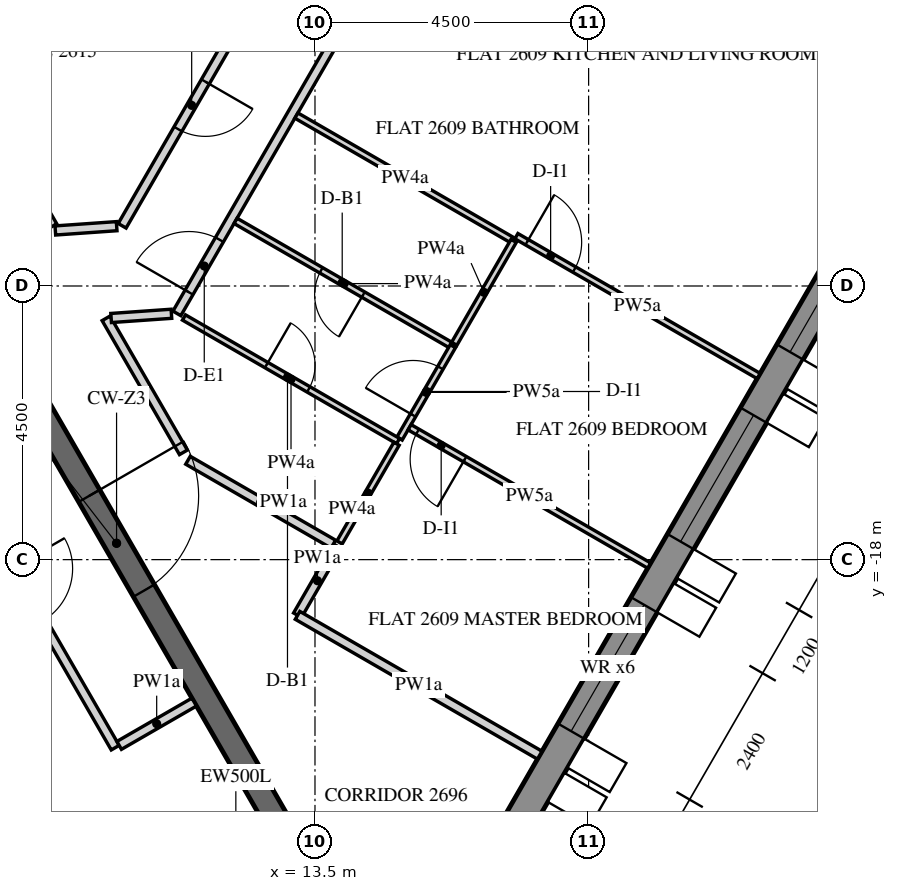
"""IFC4 building model, lengths in metres.
Left out: names, types, materials, properties, quantities, classifications, styles, units other than length and angle.
Written with IfcOpenShell. Run it as: python <this file> out.ifc"""

import sys

from ifc_helpers import new_model, si_unit, direction, frame, frame_2d, origin, place, context, subcontext, project, spatial, polyline, rectangle, outline, extrude, element, fill, save


model = new_model("IFC4")
c1 = context("Model", 3, precision=1e-05, world=origin(), true_north=direction((0.0, 1.0)))
c2 = subcontext(c1, "Body", "Model", "MODEL_VIEW")
j1 = project(units=[si_unit("LENGTHUNIT", "METRE"), si_unit("PLANEANGLEUNIT", "RADIAN")], contexts=[c1])
p1 = place(None, origin())
s1 = spatial("IfcSite", under=j1, at=p1, CompositionType="ELEMENT")
p2 = place(p1, origin())
s2 = spatial("IfcBuilding", under=s1, at=p2, CompositionType="ELEMENT")
p3 = place(p2, frame((0.0, 0.0, 326.4)))
s3 = spatial("IfcBuildingStorey", under=s2, at=p3, CompositionType="ELEMENT", Elevation=326.4)
p4 = place(p3, frame((16.451, -23.005, -0.15), z_axis=(0.0, 0.0, 1.0), x_axis=(0.500003737743, 0.866023245787, 0.0)))
e1 = element("IfcWall", 1, at=p4, inside=s3, PredefinedType="SOLIDWALL", context=c2, shape_type="SweptSolid", body=[
    extrude(outline(polyline([(-0.021, -0.25), (25.468, -0.25), (25.421, 0.25), (0.021, 0.25), (-0.021, -0.25)])), origin(), (0.0, 0.0, 1.0), 3.9),
])
p5 = place(p4, frame((2.522, 0.0, 0.75)))
e2 = element("IfcOpeningElement", 2, at=p5, cuts=e1, PredefinedType="OPENING", context=c2, shape_type="SweptSolid", body=[
    extrude(rectangle(XDim=2.4, YDim=2.7, at=frame_2d((1.2, 1.35))), frame((0.0, 0.26, 0.0), z_axis=(0.0, -1.0, 0.0), x_axis=(1.0, 0.0, 0.0)), (0.0, 0.0, 1.0), 0.52),
])
p6 = place(p4, frame((6.122, 0.0, 0.75)))
e3 = element("IfcOpeningElement", 3, at=p6, cuts=e1, PredefinedType="OPENING", context=c2, shape_type="SweptSolid", body=[
    extrude(rectangle(XDim=2.4, YDim=2.7, at=frame_2d((1.2, 1.35))), frame((0.0, 0.26, 0.0), z_axis=(0.0, -1.0, 0.0), x_axis=(1.0, 0.0, 0.0)), (0.0, 0.0, 1.0), 0.52),
])
p7 = place(p4, frame((9.722, 0.0, 0.75)))
e4 = element("IfcOpeningElement", 4, at=p7, cuts=e1, PredefinedType="OPENING", context=c2, shape_type="SweptSolid", body=[
    extrude(rectangle(XDim=2.4, YDim=2.7, at=frame_2d((1.2, 1.35))), frame((0.0, 0.26, 0.0), z_axis=(0.0, -1.0, 0.0), x_axis=(1.0, 0.0, 0.0)), (0.0, 0.0, 1.0), 0.52),
])
p8 = place(p4, frame((13.323, 0.0, 0.75)))
e5 = element("IfcOpeningElement", 5, at=p8, cuts=e1, PredefinedType="OPENING", context=c2, shape_type="SweptSolid", body=[
    extrude(rectangle(XDim=2.4, YDim=2.7, at=frame_2d((1.2, 1.35))), frame((0.0, 0.26, 0.0), z_axis=(0.0, -1.0, 0.0), x_axis=(1.0, 0.0, 0.0)), (0.0, 0.0, 1.0), 0.52),
])
p9 = place(p4, frame((16.922, 0.0, 0.75)))
e6 = element("IfcOpeningElement", 6, at=p9, cuts=e1, PredefinedType="OPENING", context=c2, shape_type="SweptSolid", body=[
    extrude(rectangle(XDim=2.4, YDim=2.7, at=frame_2d((1.2, 1.35))), frame((0.0, 0.26, 0.0), z_axis=(0.0, -1.0, 0.0), x_axis=(1.0, 0.0, 0.0)), (0.0, 0.0, 1.0), 0.52),
])
p10 = place(p4, frame((20.522, 0.0, 0.75)))
e7 = element("IfcOpeningElement", 7, at=p10, cuts=e1, PredefinedType="OPENING", context=c2, shape_type="SweptSolid", body=[
    extrude(rectangle(XDim=2.4, YDim=2.7, at=frame_2d((1.2, 1.35))), frame((0.0, 0.26, 0.0), z_axis=(0.0, -1.0, 0.0), x_axis=(1.0, 0.0, 0.0)), (0.0, 0.0, 1.0), 0.52),
])
p11 = place(p3, frame((6.235, -10.8, -0.15), z_axis=(0.0, 0.0, 1.0), x_axis=(0.499996419489, 0.866027470984, 0.0)))
e8 = element("IfcWall", 8, at=p11, inside=s3, PredefinedType="SHEAR", context=c2, shape_type="SweptSolid", body=[
    extrude(outline(polyline([(-0.115, -0.2), (12.586, -0.2), (12.355, 0.2), (0.115, 0.2), (-0.115, -0.2)])), origin(), (0.0, 0.0, 1.0), 3.9),
])
p12 = place(p11, frame((5.364, 0.0, 0.15)))
e9 = element("IfcOpeningElement", 9, at=p12, cuts=e8, PredefinedType="OPENING", context=c2, shape_type="SweptSolid", body=[
    extrude(rectangle(XDim=1.8, YDim=2.4, at=frame_2d((0.9, 1.2))), frame((0.0, 0.21, 0.0), z_axis=(0.0, -1.0, 0.0), x_axis=(1.0, 0.0, 0.0)), (0.0, 0.0, 1.0), 0.42),
])
p13 = place(p3, frame((6.351, -11.0, -0.15), z_axis=(0.0, 0.0, 1.0), x_axis=(0.499998894578, -0.866026041999, 0.0)))
e10 = element("IfcWall", 10, at=p13, inside=s3, PredefinedType="SHEAR", context=c2, shape_type="SweptSolid", body=[
    extrude(rectangle(XDim=15.544, YDim=0.4, at=frame_2d((7.772, 0.0))), origin(), (0.0, 0.0, 1.0), 3.9),
])
p14 = place(p13, frame((6.872, 0.0, 0.15)))
e11 = element("IfcOpeningElement", 11, at=p14, cuts=e10, PredefinedType="OPENING", context=c2, shape_type="SweptSolid", body=[
    extrude(rectangle(XDim=1.8, YDim=2.4, at=frame_2d((0.9, 1.2))), frame((0.0, 0.21, 0.0), z_axis=(0.0, -1.0, 0.0), x_axis=(1.0, 0.0, 0.0)), (0.0, 0.0, 1.0), 0.42),
])
p15 = place(p3, frame((6.333, -14.368, 0.0), z_axis=(0.0, 0.0, 1.0), x_axis=(0.499977396983, -0.866038453249, 0.0)))
e12 = element("IfcWall", 12, at=p15, inside=s3, PredefinedType="PARTITIONING", context=c2, shape_type="SweptSolid", body=[
    extrude(rectangle(XDim=7.764, YDim=0.15, at=frame_2d((3.882, 0.0))), origin(), (0.0, 0.0, 1.0), 2.838),
])
p16 = place(p15, frame((4.364, 0.0, 0.0)))
e13 = element("IfcOpeningElement", 13, at=p16, cuts=e12, PredefinedType="OPENING", context=c2, shape_type="SweptSolid", body=[
    extrude(rectangle(XDim=1.0, YDim=2.1, at=frame_2d((0.5, 1.05))), frame((0.0, 0.085, 0.0), z_axis=(0.0, -1.0, 0.0), x_axis=(1.0, 0.0, 0.0)), (0.0, 0.0, 1.0), 0.17),
])
p17 = place(p3, frame((10.28, -21.055, 0.0), z_axis=(0.0, 0.0, 1.0), x_axis=(0.866020080793, 0.500009219579, 0.0)))
e14 = element("IfcWall", 14, at=p17, inside=s3, PredefinedType="PARTITIONING", context=c2, shape_type="SweptSolid", body=[
    extrude(rectangle(XDim=1.425, YDim=0.15, at=frame_2d((0.712, 0.0))), origin(), (0.0, 0.0, 1.0), 2.838),
])
p18 = place(p3, frame((11.229, -13.951, 0.0), z_axis=(0.0, 0.0, 1.0), x_axis=(0.499997948852, 0.866026588012, 0.0)))
e15 = element("IfcWall", 15, at=p18, inside=s3, PredefinedType="PARTITIONING", context=c2, shape_type="SweptSolid", body=[
    extrude(rectangle(XDim=14.677, YDim=0.15, at=frame_2d((7.339, 0.0))), origin(), (0.0, 0.0, 1.0), 2.838),
])
p19 = place(p18, frame((0.4, 0.0, 0.0)))
e16 = element("IfcOpeningElement", 16, at=p19, cuts=e15, PredefinedType="OPENING", context=c2, shape_type="SweptSolid", body=[
    extrude(rectangle(XDim=1.0, YDim=2.1, at=frame_2d((0.5, 1.05))), frame((0.0, 0.085, 0.0), z_axis=(0.0, -1.0, 0.0), x_axis=(1.0, 0.0, 0.0)), (0.0, 0.0, 1.0), 0.17),
])
p20 = place(p18, frame((13.527, 0.0, 0.0)))
e17 = element("IfcOpeningElement", 17, at=p20, cuts=e15, PredefinedType="OPENING", context=c2, shape_type="SweptSolid", body=[
    extrude(rectangle(XDim=1.0, YDim=2.1, at=frame_2d((0.5, 1.05))), frame((0.0, 0.085, 0.0), z_axis=(0.0, -1.0, 0.0), x_axis=(1.0, 0.0, 0.0)), (0.0, 0.0, 1.0), 0.17),
])
p21 = place(p3, frame((13.213, -18.915, 0.0), z_axis=(0.0, 0.0, 1.0), x_axis=(0.499985832843, 0.866033583042, 0.0)))
e18 = element("IfcWall", 18, at=p21, inside=s3, PredefinedType="PARTITIONING", context=c2, shape_type="SweptSolid", body=[
    extrude(rectangle(XDim=1.311, YDim=0.15, at=frame_2d((0.655, 0.0))), origin(), (0.0, 0.0, 1.0), 2.838),
])
p22 = place(p3, frame((17.196, -21.216, 0.0), z_axis=(0.0, 0.0, 1.0), x_axis=(-0.866032643562, 0.499987460128, 0.0)))
e19 = element("IfcWall", 19, at=p22, inside=s3, PredefinedType="PARTITIONING", context=c2, shape_type="SweptSolid", body=[
    extrude(rectangle(XDim=4.599, YDim=0.15, at=frame_2d((2.299, 0.0))), origin(), (0.0, 0.0, 1.0), 2.838),
])
p23 = place(p3, frame((13.802, -17.745, 0.0), z_axis=(0.0, 0.0, 1.0), x_axis=(-0.866051521422, 0.499954760196, 0.0)))
e20 = element("IfcWall", 20, at=p23, inside=s3, PredefinedType="PARTITIONING", context=c2, shape_type="SweptSolid", body=[
    extrude(rectangle(XDim=2.76, YDim=0.15, at=frame_2d((1.38, 0.0))), origin(), (0.0, 0.0, 1.0), 2.838),
])
p24 = place(p3, frame((11.337, -16.236, 0.0), z_axis=(0.0, 0.0, 1.0), x_axis=(-0.500029781311, 0.866008208854, 0.0)))
e21 = element("IfcWall", 21, at=p24, inside=s3, PredefinedType="PARTITIONING", context=c2, shape_type="SweptSolid", body=[
    extrude(rectangle(XDim=2.544, YDim=0.15, at=frame_2d((1.272, 0.0))), origin(), (0.0, 0.0, 1.0), 2.838),
])
p25 = place(p3, frame((10.148, -14.026, 0.0), z_axis=(0.0, 0.0, 1.0), x_axis=(0.99756238904, 0.069780226228, 0.0)))
e22 = element("IfcWall", 22, at=p25, inside=s3, PredefinedType="PARTITIONING", context=c2, shape_type="SweptSolid", body=[
    extrude(rectangle(XDim=0.994, YDim=0.15, at=frame_2d((0.497, 0.0))), origin(), (0.0, 0.0, 1.0), 2.838),
])
p26 = place(p3, frame((12.615, -8.549, 0.0), z_axis=(0.0, 0.0, 1.0), x_axis=(-0.499985850067, -0.866033573098, 0.0)))
e23 = element("IfcWall", 23, at=p26, inside=s3, PredefinedType="PARTITIONING", context=c2, shape_type="SweptSolid", body=[
    extrude(rectangle(XDim=4.573, YDim=0.15, at=frame_2d((2.287, 0.0))), origin(), (0.0, 0.0, 1.0), 2.838),
])
p27 = place(p26, frame((1.837, 0.0, 0.0)))
e24 = element("IfcOpeningElement", 24, at=p27, cuts=e23, PredefinedType="OPENING", context=c2, shape_type="SweptSolid", body=[
    extrude(rectangle(XDim=0.9, YDim=2.1, at=frame_2d((0.45, 1.05))), frame((0.0, 0.085, 0.0), z_axis=(0.0, -1.0, 0.0), x_axis=(1.0, 0.0, 0.0)), (0.0, 0.0, 1.0), 0.17),
])
p28 = place(p3, frame((10.239, -12.516, 0.0), z_axis=(0.0, 0.0, 1.0), x_axis=(-0.997561825928, -0.069788275888, 0.0)))
e25 = element("IfcWall", 25, at=p28, inside=s3, PredefinedType="PARTITIONING", context=c2, shape_type="SweptSolid", body=[
    extrude(rectangle(XDim=1.011, YDim=0.15, at=frame_2d((0.505, 0.0))), origin(), (0.0, 0.0, 1.0), 2.838),
])
p29 = place(p3, frame((9.188, -12.515, 0.0), z_axis=(0.0, 0.0, 1.0), x_axis=(-0.499998034377, 0.866026538634, 0.0)))
e26 = element("IfcWall", 26, at=p29, inside=s3, PredefinedType="PARTITIONING", context=c2, shape_type="SweptSolid", body=[
    extrude(rectangle(XDim=0.946, YDim=0.15, at=frame_2d((0.473, 0.0))), origin(), (0.0, 0.0, 1.0), 2.838),
])
p30 = place(p3, frame((13.194, -10.697, 0.0), z_axis=(0.0, 0.0, 1.0), x_axis=(0.866019999656, -0.500009360108, 0.0)))
e27 = element("IfcWall", 27, at=p30, inside=s3, PredefinedType="PARTITIONING", context=c2, shape_type="SweptSolid", body=[
    extrude(rectangle(XDim=4.125, YDim=0.1, at=frame_2d((2.062, 0.0))), origin(), (0.0, 0.0, 1.0), 2.838),
])
p31 = place(p3, frame((16.812, -12.68, 0.0), z_axis=(0.0, 0.0, 1.0), x_axis=(0.866030038822, -0.499991971794, 0.0)))
e28 = element("IfcWall", 28, at=p31, inside=s3, PredefinedType="PARTITIONING", context=c2, shape_type="SweptSolid", body=[
    extrude(rectangle(XDim=4.6, YDim=0.1, at=frame_2d((2.3, 0.0))), origin(), (0.0, 0.0, 1.0), 2.838),
])
p32 = place(p31, frame((0.2, 0.0, 0.0)))
e29 = element("IfcOpeningElement", 29, at=p32, cuts=e28, PredefinedType="OPENING", context=c2, shape_type="SweptSolid", body=[
    extrude(rectangle(XDim=0.9, YDim=2.1, at=frame_2d((0.45, 1.05))), frame((0.0, 0.06, 0.0), z_axis=(0.0, -1.0, 0.0), x_axis=(1.0, 0.0, 0.0)), (0.0, 0.0, 1.0), 0.12),
])
p33 = place(p3, frame((15.766, -14.492, 0.0), z_axis=(0.0, 0.0, 1.0), x_axis=(-0.866019999656, 0.500009360108, 0.0)))
e30 = element("IfcWall", 30, at=p33, inside=s3, PredefinedType="PARTITIONING", context=c2, shape_type="SweptSolid", body=[
    extrude(rectangle(XDim=4.125, YDim=0.1, at=frame_2d((2.062, 0.0))), origin(), (0.0, 0.0, 1.0), 2.838),
])
p34 = place(p33, frame((1.7, 0.0, 0.0)))
e31 = element("IfcOpeningElement", 31, at=p34, cuts=e30, PredefinedType="OPENING", context=c2, shape_type="SweptSolid", body=[
    extrude(rectangle(XDim=0.8, YDim=2.1, at=frame_2d((0.4, 1.05))), frame((0.0, 0.06, 0.0), z_axis=(0.0, -1.0, 0.0), x_axis=(1.0, 0.0, 0.0)), (0.0, 0.0, 1.0), 0.12),
])
p35 = place(p3, frame((14.89, -16.009, 0.0), z_axis=(0.0, 0.0, 1.0), x_axis=(0.499971461383, 0.866041879935, 0.0)))
e32 = element("IfcWall", 32, at=p35, inside=s3, PredefinedType="PARTITIONING", context=c2, shape_type="SweptSolid", body=[
    extrude(rectangle(XDim=1.754, YDim=0.1, at=frame_2d((0.877, 0.0))), origin(), (0.0, 0.0, 1.0), 2.838),
])
p36 = place(p35, frame((0.444, 0.0, 0.0)))
e33 = element("IfcOpeningElement", 33, at=p36, cuts=e32, PredefinedType="OPENING", context=c2, shape_type="SweptSolid", body=[
    extrude(rectangle(XDim=0.9, YDim=2.1, at=frame_2d((0.45, 1.05))), frame((0.0, 0.06, 0.0), z_axis=(0.0, -1.0, 0.0), x_axis=(1.0, 0.0, 0.0)), (0.0, 0.0, 1.0), 0.12),
])
p37 = place(p3, frame((11.345, -14.018, 0.0), z_axis=(0.0, 0.0, 1.0), x_axis=(0.866028600041, -0.49999446388, 0.0)))
e34 = element("IfcWall", 34, at=p37, inside=s3, PredefinedType="PARTITIONING", context=c2, shape_type="SweptSolid", body=[
    extrude(rectangle(XDim=4.066, YDim=0.1, at=frame_2d((2.033, 0.0))), origin(), (0.0, 0.0, 1.0), 2.838),
])
p38 = place(p37, frame((1.566, 0.0, 0.0)))
e35 = element("IfcOpeningElement", 35, at=p38, cuts=e34, PredefinedType="OPENING", context=c2, shape_type="SweptSolid", body=[
    extrude(rectangle(XDim=0.8, YDim=2.1, at=frame_2d((0.4, 1.05))), frame((0.0, 0.06, 0.0), z_axis=(0.0, -1.0, 0.0), x_axis=(1.0, 0.0, 0.0)), (0.0, 0.0, 1.0), 0.12),
])
p39 = place(p3, frame((15.79, -14.45, 0.0), z_axis=(0.0, 0.0, 1.0), x_axis=(0.500036104519, 0.866004557827, 0.0)))
e36 = element("IfcWall", 36, at=p39, inside=s3, PredefinedType="PARTITIONING", context=c2, shape_type="SweptSolid", body=[
    extrude(rectangle(XDim=1.954, YDim=0.1, at=frame_2d((0.977, 0.0))), origin(), (0.0, 0.0, 1.0), 2.838),
])
p40 = place(p3, frame((18.996, -18.098, 0.0), z_axis=(0.0, 0.0, 1.0), x_axis=(-0.866035472144, 0.499982560684, 0.0)))
e37 = element("IfcWall", 37, at=p40, inside=s3, PredefinedType="PARTITIONING", context=c2, shape_type="SweptSolid", body=[
    extrude(rectangle(XDim=4.55, YDim=0.1, at=frame_2d((2.275, 0.0))), origin(), (0.0, 0.0, 1.0), 2.838),
])
p41 = place(p40, frame((3.5, 0.0, 0.0)))
e38 = element("IfcOpeningElement", 38, at=p41, cuts=e37, PredefinedType="OPENING", context=c2, shape_type="SweptSolid", body=[
    extrude(rectangle(XDim=0.9, YDim=2.1, at=frame_2d((0.45, 1.05))), frame((0.0, 0.06, 0.0), z_axis=(0.0, -1.0, 0.0), x_axis=(1.0, 0.0, 0.0)), (0.0, 0.0, 1.0), 0.12),
])
p42 = place(p3, frame((14.841, -16.094, 0.0), z_axis=(0.0, 0.0, 1.0), x_axis=(-0.500004234368, -0.866022959057, 0.0)))
e39 = element("IfcWall", 39, at=p42, inside=s3, PredefinedType="PARTITIONING", context=c2, shape_type="SweptSolid", body=[
    extrude(rectangle(XDim=1.875, YDim=0.1, at=frame_2d((0.938, 0.0))), origin(), (0.0, 0.0, 1.0), 2.838),
])
p43 = place(p5, frame((0.0, 0.18, 0.0)))
e40 = element("IfcWindow", 40, at=p43, inside=s3, PartitioningType="DOUBLE_PANEL_VERTICAL", PredefinedType="WINDOW", context=c2, shape_type="SweptSolid", body=[
    extrude(rectangle(XDim=2.4, YDim=2.7, at=frame_2d((1.2, 1.35))), frame((0.0, 0.03, 0.0), z_axis=(0.0, -1.0, 0.0), x_axis=(1.0, 0.0, 0.0)), (0.0, 0.0, 1.0), 0.06),
])
fill(e2, e40)
p44 = place(p6, frame((0.0, 0.18, 0.0)))
e41 = element("IfcWindow", 41, at=p44, inside=s3, PartitioningType="DOUBLE_PANEL_VERTICAL", PredefinedType="WINDOW", context=c2, shape_type="SweptSolid", body=[
    extrude(rectangle(XDim=2.4, YDim=2.7, at=frame_2d((1.2, 1.35))), frame((0.0, 0.03, 0.0), z_axis=(0.0, -1.0, 0.0), x_axis=(1.0, 0.0, 0.0)), (0.0, 0.0, 1.0), 0.06),
])
fill(e3, e41)
p45 = place(p7, frame((0.0, 0.18, 0.0)))
e42 = element("IfcWindow", 42, at=p45, inside=s3, PartitioningType="DOUBLE_PANEL_VERTICAL", PredefinedType="WINDOW", context=c2, shape_type="SweptSolid", body=[
    extrude(rectangle(XDim=2.4, YDim=2.7, at=frame_2d((1.2, 1.35))), frame((0.0, 0.03, 0.0), z_axis=(0.0, -1.0, 0.0), x_axis=(1.0, 0.0, 0.0)), (0.0, 0.0, 1.0), 0.06),
])
fill(e4, e42)
p46 = place(p14, origin())
e43 = element("IfcDoor", 43, at=p46, inside=s3, OperationType="DOUBLE_DOOR_SINGLE_SWING", PredefinedType="DOOR", context=c2, shape_type="SweptSolid", body=[
    extrude(rectangle(XDim=1.8, YDim=2.4, at=frame_2d((0.9, 1.2))), frame((0.0, 0.025, 0.0), z_axis=(0.0, -1.0, 0.0), x_axis=(1.0, 0.0, 0.0)), (0.0, 0.0, 1.0), 0.05),
])
fill(e11, e43)
p47 = place(p19, origin())
e44 = element("IfcDoor", 44, at=p47, inside=s3, OperationType="SINGLE_SWING_RIGHT", PredefinedType="DOOR", context=c2, shape_type="SweptSolid", body=[
    extrude(rectangle(XDim=1.0, YDim=2.1, at=frame_2d((0.5, 1.05))), frame((0.0, 0.025, 0.0), z_axis=(0.0, -1.0, 0.0), x_axis=(1.0, 0.0, 0.0)), (0.0, 0.0, 1.0), 0.05),
])
fill(e16, e44)
p48 = place(p34, origin())
e45 = element("IfcDoor", 45, at=p48, inside=s3, OperationType="SINGLE_SWING_LEFT", PredefinedType="DOOR", context=c2, shape_type="SweptSolid", body=[
    extrude(rectangle(XDim=0.8, YDim=2.1, at=frame_2d((0.4, 1.05))), frame((0.0, 0.025, 0.0), z_axis=(0.0, -1.0, 0.0), x_axis=(1.0, 0.0, 0.0)), (0.0, 0.0, 1.0), 0.05),
])
fill(e31, e45)
p49 = place(p36, origin())
e46 = element("IfcDoor", 46, at=p49, inside=s3, OperationType="SINGLE_SWING_RIGHT", PredefinedType="DOOR", context=c2, shape_type="SweptSolid", body=[
    extrude(rectangle(XDim=0.9, YDim=2.1, at=frame_2d((0.45, 1.05))), frame((0.0, 0.025, 0.0), z_axis=(0.0, -1.0, 0.0), x_axis=(1.0, 0.0, 0.0)), (0.0, 0.0, 1.0), 0.05),
])
fill(e33, e46)
p50 = place(p41, origin())
e47 = element("IfcDoor", 47, at=p50, inside=s3, OperationType="SINGLE_SWING_RIGHT", PredefinedType="DOOR", context=c2, shape_type="SweptSolid", body=[
    extrude(rectangle(XDim=0.9, YDim=2.1, at=frame_2d((0.45, 1.05))), frame((0.0, 0.025, 0.0), z_axis=(0.0, -1.0, 0.0), x_axis=(1.0, 0.0, 0.0)), (0.0, 0.0, 1.0), 0.05),
])
fill(e38, e47)
p51 = place(p32, origin())
e48 = element("IfcDoor", 48, at=p51, inside=s3, OperationType="SINGLE_SWING_RIGHT", PredefinedType="DOOR", context=c2, shape_type="SweptSolid", body=[
    extrude(rectangle(XDim=0.9, YDim=2.1, at=frame_2d((0.45, 1.05))), frame((0.0, 0.025, 0.0), z_axis=(0.0, -1.0, 0.0), x_axis=(1.0, 0.0, 0.0)), (0.0, 0.0, 1.0), 0.05),
])
fill(e29, e48)
p52 = place(p38, origin())
e49 = element("IfcDoor", 49, at=p52, inside=s3, OperationType="SINGLE_SWING_RIGHT", PredefinedType="DOOR", context=c2, shape_type="SweptSolid", body=[
    extrude(rectangle(XDim=0.8, YDim=2.1, at=frame_2d((0.4, 1.05))), frame((0.0, 0.025, 0.0), z_axis=(0.0, -1.0, 0.0), x_axis=(1.0, 0.0, 0.0)), (0.0, 0.0, 1.0), 0.05),
])
fill(e35, e49)
p53 = place(p27, origin())
e50 = element("IfcDoor", 50, at=p53, inside=s3, OperationType="SINGLE_SWING_LEFT", PredefinedType="DOOR", context=c2, shape_type="SweptSolid", body=[
    extrude(rectangle(XDim=0.9, YDim=2.1, at=frame_2d((0.45, 1.05))), frame((0.0, 0.025, 0.0), z_axis=(0.0, -1.0, 0.0), x_axis=(1.0, 0.0, 0.0)), (0.0, 0.0, 1.0), 0.05),
])
fill(e24, e50)
save(model, sys.argv[1])
